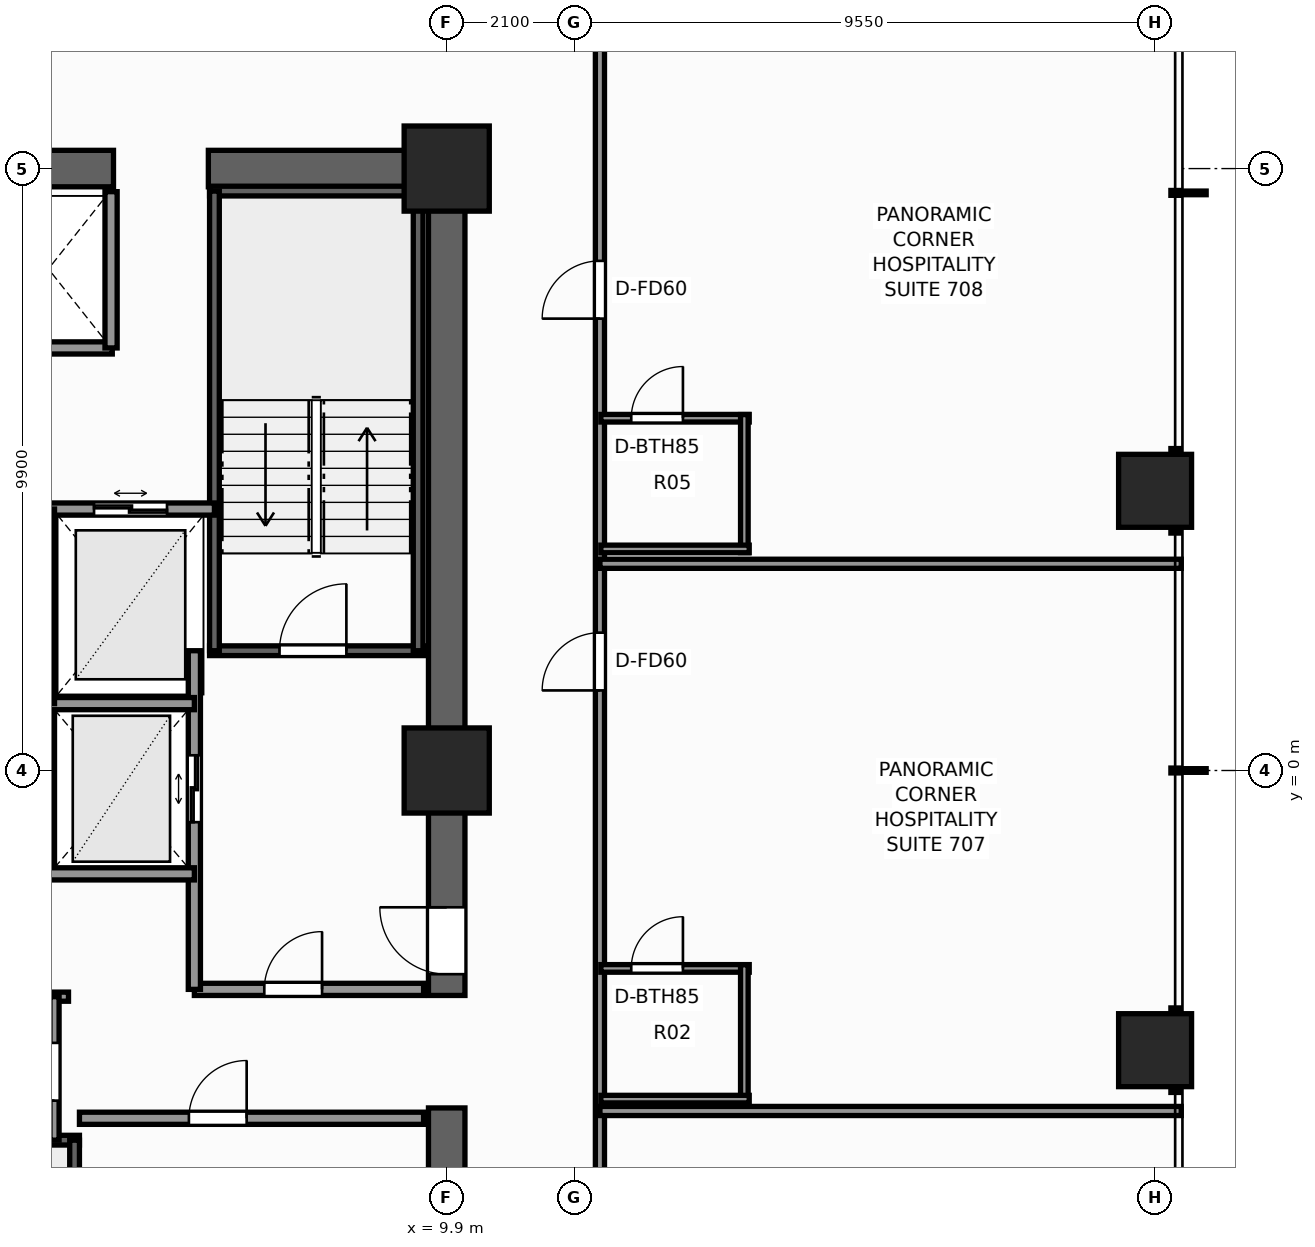
"""IFC4 building model, lengths in metres.
Left out: names, types, materials, properties, quantities, classifications, styles, units other than length and angle.
Written with IfcOpenShell. Run it as: python <this file> out.ifc"""

import sys

from ifc_helpers import new_model, si_unit, direction, frame, frame_2d, origin, origin_2d, place, context, subcontext, project, spatial, rectangle, extrude, element, fill, save


model = new_model("IFC4")
c1 = context("Model", 3, precision=1e-05, world=origin(), true_north=direction((0.0, 1.0)))
c2 = subcontext(c1, "Body", "Model", "MODEL_VIEW")
j1 = project(units=[si_unit("LENGTHUNIT", "METRE"), si_unit("PLANEANGLEUNIT", "RADIAN")], contexts=[c1])
p1 = place(None, origin())
s1 = spatial("IfcSite", under=j1, at=p1, CompositionType="ELEMENT")
p2 = place(p1, origin())
s2 = spatial("IfcBuilding", under=s1, at=p2, CompositionType="ELEMENT")
p3 = place(p2, frame((0.0, 0.0, 27.1)))
s3 = spatial("IfcBuildingStorey", under=s2, at=p3, CompositionType="ELEMENT", Elevation=27.1)
p4 = place(p3, frame((-10.2, 9.9, 0.0), z_axis=(0.0, 0.0, 1.0), x_axis=(1.0, 0.0, 0.0)))
e1 = element("IfcWall", 1, at=p4, inside=s3, PredefinedType="SHEAR", context=c2, shape_type="SweptSolid", body=[
    extrude(rectangle(XDim=14.62, YDim=0.6, at=frame_2d((7.31, 0.0))), origin(), (0.0, 0.0, 1.0), 3.3),
])
p5 = place(p3, frame((5.98, 9.9, 0.0), z_axis=(0.0, 0.0, 1.0), x_axis=(1.0, 0.0, 0.0)))
e2 = element("IfcWall", 2, at=p5, inside=s3, PredefinedType="SHEAR", context=c2, shape_type="SweptSolid", body=[
    extrude(rectangle(XDim=4.22, YDim=0.6, at=frame_2d((2.11, 0.0))), origin(), (0.0, 0.0, 1.0), 3.3),
])
p6 = place(p3, frame((9.9, -9.6, 0.0), z_axis=(0.0, 0.0, 1.0), x_axis=(0.0, 1.0, 0.0)))
e3 = element("IfcWall", 3, at=p6, inside=s3, PredefinedType="SHEAR", context=c2, shape_type="SweptSolid", body=[
    extrude(rectangle(XDim=4.05, YDim=0.6, at=frame_2d((2.025, 0.0))), origin(), (0.0, 0.0, 1.0), 3.3),
])
p7 = place(p3, frame((9.9, -3.7, 0.0), z_axis=(0.0, 0.0, 1.0), x_axis=(0.0, 1.0, 0.0)))
e4 = element("IfcWall", 4, at=p7, inside=s3, PredefinedType="SHEAR", context=c2, shape_type="SweptSolid", body=[
    extrude(rectangle(XDim=13.3, YDim=0.6, at=frame_2d((6.65, 0.0))), origin(), (0.0, 0.0, 1.0), 3.3),
])
p8 = place(p7, frame((0.35, 0.0, 0.0)))
e5 = element("IfcOpeningElement", 5, at=p8, cuts=e4, PredefinedType="OPENING", context=c2, shape_type="SweptSolid", body=[
    extrude(rectangle(XDim=1.1, YDim=2.2, at=frame_2d((0.55, 1.1))), frame((0.0, 0.31, 0.0), z_axis=(0.0, -1.0, 0.0), x_axis=(1.0, 0.0, 0.0)), (0.0, 0.0, 1.0), 0.62),
])
for number, where, z_axis, x_axis in (
    (6, (9.9, 9.9, 0.0), (0.0, 0.0, 1.0), (1.0, 0.0, 0.0)),
    (7, (9.9, 0.0, 0.0), (0.0, 0.0, 1.0), (1.0, 0.0, 0.0)),
):
    element("IfcColumn", number, at=place(p3, frame(where, z_axis=z_axis, x_axis=x_axis)), inside=s3, PredefinedType="COLUMN", context=c2, shape_type="SweptSolid", body=[
        extrude(rectangle(XDim=1.4, YDim=1.4, at=origin_2d()), origin(), (0.0, 0.0, 1.0), 3.3),
    ])
for number, where, z_axis, x_axis in (
    (8, (21.55, -4.6, 0.0), (0.0, 0.0, 1.0), (1.0, 0.0, 0.0)),
    (9, (21.55, 4.6, 0.0), (0.0, 0.0, 1.0), (1.0, 0.0, 0.0)),
):
    element("IfcColumn", number, at=place(p3, frame(where, z_axis=z_axis, x_axis=x_axis)), inside=s3, PredefinedType="COLUMN", context=c2, shape_type="SweptSolid", body=[
        extrude(rectangle(XDim=1.2, YDim=1.2, at=origin_2d()), origin(), (0.0, 0.0, 1.0), 3.3),
    ])
p9 = place(p3, frame((6.0, 1.97, 0.0), z_axis=(0.0, 0.0, 1.0), x_axis=(1.0, 0.0, 0.0)))
e10 = element("IfcWall", 10, at=p9, inside=s3, PredefinedType="SHEAR", context=c2, shape_type="SweptSolid", body=[
    extrude(rectangle(XDim=3.52, YDim=0.16, at=frame_2d((1.76, 0.0))), origin(), (0.0, 0.0, 1.0), 3.3),
])
p10 = place(p9, frame((1.15, 0.0, 0.0)))
e11 = element("IfcOpeningElement", 11, at=p10, cuts=e10, PredefinedType="OPENING", context=c2, shape_type="SweptSolid", body=[
    extrude(rectangle(XDim=1.1, YDim=2.2, at=frame_2d((0.55, 1.1))), frame((0.0, 0.09, 0.0), z_axis=(0.0, -1.0, 0.0), x_axis=(1.0, 0.0, 0.0)), (0.0, 0.0, 1.0), 0.18),
])
p11 = place(p3, frame((6.0, 9.53, 0.0), z_axis=(0.0, 0.0, 1.0), x_axis=(1.0, 0.0, 0.0)))
e12 = element("IfcWall", 12, at=p11, inside=s3, PredefinedType="SHEAR", context=c2, shape_type="SweptSolid", body=[
    extrude(rectangle(XDim=3.52, YDim=0.16, at=frame_2d((1.76, 0.0))), origin(), (0.0, 0.0, 1.0), 3.3),
])
for number, where, z_axis, x_axis in (
    (13, (6.08, 1.97, 0.0), (0.0, 0.0, 1.0), (0.0, 1.0, 0.0)),
    (14, (9.43, 1.97, 0.0), (0.0, 0.0, 1.0), (0.0, 1.0, 0.0)),
):
    element("IfcWall", number, at=place(p3, frame(where, z_axis=z_axis, x_axis=x_axis)), inside=s3, PredefinedType="SHEAR", context=c2, shape_type="SweptSolid", body=[
        extrude(rectangle(XDim=7.56, YDim=0.16, at=frame_2d((3.78, 0.0))), origin(), (0.0, 0.0, 1.0), 3.3),
    ])
p12 = place(p3, frame((-3.86, -6.08, 0.0), z_axis=(0.0, 0.0, 1.0), x_axis=(1.0, 0.0, 0.0)))
e15 = element("IfcWall", 15, at=p12, inside=s3, PredefinedType="SHEAR", context=c2, shape_type="SweptSolid", body=[
    extrude(rectangle(XDim=7.72, YDim=0.16, at=frame_2d((3.86, 0.0))), origin(), (0.0, 0.0, 1.0), 3.3),
])
p13 = place(p3, frame((3.78, -9.43, 0.0), z_axis=(0.0, 0.0, 1.0), x_axis=(0.0, 1.0, 0.0)))
e16 = element("IfcWall", 16, at=p13, inside=s3, PredefinedType="SHEAR", context=c2, shape_type="SweptSolid", body=[
    extrude(rectangle(XDim=3.35, YDim=0.16, at=frame_2d((1.675, 0.0))), origin(), (0.0, 0.0, 1.0), 3.3),
])
p14 = place(p3, frame((5.75, -3.6, 0.0), z_axis=(0.0, 0.0, 1.0), x_axis=(1.0, 0.0, 0.0)))
e17 = element("IfcWall", 17, at=p14, inside=s3, PredefinedType="SOLIDWALL", context=c2, shape_type="SweptSolid", body=[
    extrude(rectangle(XDim=3.77, YDim=0.2, at=frame_2d((1.885, 0.0))), origin(), (0.0, 0.0, 1.0), 3.06),
])
p15 = place(p14, frame((1.15, 0.0, 0.0)))
e18 = element("IfcOpeningElement", 18, at=p15, cuts=e17, PredefinedType="OPENING", context=c2, shape_type="SweptSolid", body=[
    extrude(rectangle(XDim=0.95, YDim=2.06, at=frame_2d((0.475, 1.03))), frame((0.0, 0.11, 0.0), z_axis=(0.0, -1.0, 0.0), x_axis=(1.0, 0.0, 0.0)), (0.0, 0.0, 1.0), 0.22),
])
p16 = place(p3, frame((5.75, -3.6, 0.0), z_axis=(0.0, 0.0, 1.0), x_axis=(0.0, 1.0, 0.0)))
e19 = element("IfcWall", 19, at=p16, inside=s3, PredefinedType="SOLIDWALL", context=c2, shape_type="SweptSolid", body=[
    extrude(rectangle(XDim=5.57, YDim=0.2, at=frame_2d((2.785, 0.0))), origin(), (0.0, 0.0, 1.0), 3.06),
])
p17 = place(p16, frame((2.75, 0.0, 0.0)))
e20 = element("IfcOpeningElement", 20, at=p17, cuts=e19, PredefinedType="OPENING", context=c2, shape_type="SweptSolid", body=[
    extrude(rectangle(XDim=1.1, YDim=2.2, at=frame_2d((0.55, 1.1))), frame((0.0, 0.11, 0.0), z_axis=(0.0, -1.0, 0.0), x_axis=(1.0, 0.0, 0.0)), (0.0, 0.0, 1.0), 0.22),
])
p18 = place(p3, frame((3.35, -1.7, 0.0), z_axis=(0.0, 0.0, 1.0), x_axis=(0.0, 1.0, 0.0)))
e21 = element("IfcWall", 21, at=p18, inside=s3, PredefinedType="SOLIDWALL", context=c2, shape_type="SweptSolid", body=[
    extrude(rectangle(XDim=2.8, YDim=0.2, at=frame_2d((1.4, 0.0))), origin(), (0.0, 0.0, 1.0), 3.06),
])
for number, where, z_axis, x_axis in (
    (22, (3.35, -1.7, 0.0), (0.0, 0.0, 1.0), (1.0, 0.0, 0.0)),
    (23, (3.35, 1.1, 0.0), (0.0, 0.0, 1.0), (1.0, 0.0, 0.0)),
):
    element("IfcWall", number, at=place(p3, frame(where, z_axis=z_axis, x_axis=x_axis)), inside=s3, PredefinedType="SOLIDWALL", context=c2, shape_type="SweptSolid", body=[
        extrude(rectangle(XDim=2.4, YDim=0.2, at=frame_2d((1.2, 0.0))), origin(), (0.0, 0.0, 1.0), 3.06),
    ])
p19 = place(p3, frame((3.35, 4.3, 0.0), z_axis=(0.0, 0.0, 1.0), x_axis=(1.0, 0.0, 0.0)))
e24 = element("IfcWall", 24, at=p19, inside=s3, PredefinedType="SOLIDWALL", context=c2, shape_type="SweptSolid", body=[
    extrude(rectangle(XDim=2.73, YDim=0.2, at=frame_2d((1.365, 0.0))), origin(), (0.0, 0.0, 1.0), 3.06),
])
p20 = place(p19, frame((0.75, 0.0, 0.0)))
e25 = element("IfcOpeningElement", 25, at=p20, cuts=e24, PredefinedType="OPENING", context=c2, shape_type="SweptSolid", body=[
    extrude(rectangle(XDim=1.2, YDim=2.25, at=frame_2d((0.6, 1.125))), frame((0.0, 0.11, 0.0), z_axis=(0.0, -1.0, 0.0), x_axis=(1.0, 0.0, 0.0)), (0.0, 0.0, 1.0), 0.22),
])
p21 = place(p3, frame((0.22, 6.95, 0.0), z_axis=(0.0, 0.0, 1.0), x_axis=(1.0, 0.0, 0.0)))
e26 = element("IfcWall", 26, at=p21, inside=s3, PredefinedType="SOLIDWALL", context=c2, shape_type="SweptSolid", body=[
    extrude(rectangle(XDim=4.18, YDim=0.2, at=frame_2d((2.09, 0.0))), origin(), (0.0, 0.0, 1.0), 3.06),
])
p22 = place(p3, frame((4.38, 6.95, 0.0), z_axis=(0.0, 0.0, 1.0), x_axis=(0.0, 1.0, 0.0)))
e27 = element("IfcWall", 27, at=p22, inside=s3, PredefinedType="SOLIDWALL", context=c2, shape_type="SweptSolid", body=[
    extrude(rectangle(XDim=2.57, YDim=0.2, at=frame_2d((1.285, 0.0))), origin(), (0.0, 0.0, 1.0), 3.06),
])
p23 = place(p3, frame((3.86, -5.72, 0.0), z_axis=(0.0, 0.0, 1.0), x_axis=(1.0, 0.0, 0.0)))
e28 = element("IfcWall", 28, at=p23, inside=s3, PredefinedType="SOLIDWALL", context=c2, shape_type="SweptSolid", body=[
    extrude(rectangle(XDim=5.66, YDim=0.2, at=frame_2d((2.83, 0.0))), origin(), (0.0, 0.0, 1.0), 3.06),
])
p24 = place(p23, frame((1.8, 0.0, 0.0)))
e29 = element("IfcOpeningElement", 29, at=p24, cuts=e28, PredefinedType="OPENING", context=c2, shape_type="SweptSolid", body=[
    extrude(rectangle(XDim=0.95, YDim=2.06, at=frame_2d((0.475, 1.03))), frame((0.0, 0.11, 0.0), z_axis=(0.0, -1.0, 0.0), x_axis=(1.0, 0.0, 0.0)), (0.0, 0.0, 1.0), 0.22),
])
p25 = place(p3, frame((3.35, 1.1, 0.0), z_axis=(0.0, 0.0, 1.0), x_axis=(0.0, 1.0, 0.0)))
e30 = element("IfcWall", 30, at=p25, inside=s3, PredefinedType="SOLIDWALL", context=c2, shape_type="SweptSolid", body=[
    extrude(rectangle(XDim=3.2, YDim=0.2, at=frame_2d((1.6, 0.0))), origin(), (0.0, 0.0, 1.0), 3.06),
])
p26 = place(p3, frame((-3.68, -3.72, 0.0), z_axis=(0.0, 0.0, 1.0), x_axis=(1.0, 0.0, 0.0)))
e31 = element("IfcWall", 31, at=p26, inside=s3, PredefinedType="PARTITIONING", context=c2, shape_type="SweptSolid", body=[
    extrude(rectangle(XDim=7.36, YDim=0.15, at=frame_2d((3.68, 0.0))), origin(), (0.0, 0.0, 1.0), 3.06),
])
p27 = place(p3, frame((3.45, -6.08, 0.0), z_axis=(0.0, 0.0, 1.0), x_axis=(0.0, 1.0, 0.0)))
e32 = element("IfcWall", 32, at=p27, inside=s3, PredefinedType="PARTITIONING", context=c2, shape_type="SweptSolid", body=[
    extrude(rectangle(XDim=2.36, YDim=0.15, at=frame_2d((1.18, 0.0))), origin(), (0.0, 0.0, 1.0), 3.06),
])
p28 = place(p27, frame((0.65, 0.0, 0.0)))
e33 = element("IfcOpeningElement", 33, at=p28, cuts=e32, PredefinedType="OPENING", context=c2, shape_type="SweptSolid", body=[
    extrude(rectangle(XDim=0.95, YDim=2.06, at=frame_2d((0.475, 1.03))), frame((0.0, 0.085, 0.0), z_axis=(0.0, -1.0, 0.0), x_axis=(1.0, 0.0, 0.0)), (0.0, 0.0, 1.0), 0.17),
])
p29 = place(p3, frame((12.42, -12.26, 0.0), z_axis=(0.0, 0.0, 1.0), x_axis=(0.0, 1.0, 0.0)))
e34 = element("IfcWall", 34, at=p29, inside=s3, PredefinedType="PARTITIONING", context=c2, shape_type="SweptSolid", body=[
    extrude(rectangle(XDim=24.84, YDim=0.15, at=frame_2d((12.42, 0.0))), origin(), (0.0, 0.0, 1.0), 2.272),
])
p30 = place(p29, frame((4.099, 0.0, 0.0)))
e35 = element("IfcOpeningElement", 35, at=p30, cuts=e34, PredefinedType="OPENING", context=c2, shape_type="SweptSolid", body=[
    extrude(rectangle(XDim=0.95, YDim=2.06, at=frame_2d((0.475, 1.03))), frame((0.0, 0.085, 0.0), z_axis=(0.0, -1.0, 0.0), x_axis=(1.0, 0.0, 0.0)), (0.0, 0.0, 1.0), 0.17),
])
p31 = place(p29, frame((13.577, 0.0, 0.0)))
e36 = element("IfcOpeningElement", 36, at=p31, cuts=e34, PredefinedType="OPENING", context=c2, shape_type="SweptSolid", body=[
    extrude(rectangle(XDim=0.95, YDim=2.06, at=frame_2d((0.475, 1.03))), frame((0.0, 0.085, 0.0), z_axis=(0.0, -1.0, 0.0), x_axis=(1.0, 0.0, 0.0)), (0.0, 0.0, 1.0), 0.17),
])
p32 = place(p29, frame((19.692, 0.0, 0.0)))
e37 = element("IfcOpeningElement", 37, at=p32, cuts=e34, PredefinedType="OPENING", context=c2, shape_type="SweptSolid", body=[
    extrude(rectangle(XDim=0.95, YDim=2.06, at=frame_2d((0.475, 1.03))), frame((0.0, 0.085, 0.0), z_axis=(0.0, -1.0, 0.0), x_axis=(1.0, 0.0, 0.0)), (0.0, 0.0, 1.0), 0.17),
])
for number, where, z_axis, x_axis in (
    (38, (12.42, -5.6, 0.0), (0.0, 0.0, 1.0), (1.0, 0.0, 0.0)),
    (39, (12.42, 3.4, 0.0), (0.0, 0.0, 1.0), (1.0, 0.0, 0.0)),
):
    element("IfcWall", number, at=place(p3, frame(where, z_axis=z_axis, x_axis=x_axis)), inside=s3, PredefinedType="PARTITIONING", context=c2, shape_type="SweptSolid", body=[
        extrude(rectangle(XDim=9.56, YDim=0.15, at=frame_2d((4.78, 0.0))), origin(), (0.0, 0.0, 1.0), 2.429),
    ])
p33 = place(p3, frame((12.435, -3.255, 0.0), z_axis=(0.0, 0.0, 1.0), x_axis=(1.0, 0.0, 0.0)))
e40 = element("IfcWall", 40, at=p33, inside=s3, PredefinedType="PARTITIONING", context=c2, shape_type="SweptSolid", body=[
    extrude(rectangle(XDim=2.44, YDim=0.125, at=frame_2d((1.22, 0.0))), origin(), (0.0, 0.0, 1.0), 3.06),
])
p34 = place(p33, frame((0.5, 0.0, 0.0)))
e41 = element("IfcOpeningElement", 41, at=p34, cuts=e40, PredefinedType="OPENING", context=c2, shape_type="SweptSolid", body=[
    extrude(rectangle(XDim=0.85, YDim=2.03, at=frame_2d((0.425, 1.015))), frame((0.0, 0.073, 0.0), z_axis=(0.0, -1.0, 0.0), x_axis=(1.0, 0.0, 0.0)), (0.0, 0.0, 1.0), 0.145),
])
p35 = place(p3, frame((14.795, -5.465, 0.0), z_axis=(0.0, 0.0, 1.0), x_axis=(0.0, 1.0, 0.0)))
e42 = element("IfcWall", 42, at=p35, inside=s3, PredefinedType="PARTITIONING", context=c2, shape_type="SweptSolid", body=[
    extrude(rectangle(XDim=2.27, YDim=0.125, at=frame_2d((1.135, 0.0))), origin(), (0.0, 0.0, 1.0), 2.272),
])
p36 = place(p3, frame((12.435, -5.405, 0.0), z_axis=(0.0, 0.0, 1.0), x_axis=(1.0, 0.0, 0.0)))
e43 = element("IfcWall", 43, at=p36, inside=s3, PredefinedType="PARTITIONING", context=c2, shape_type="SweptSolid", body=[
    extrude(rectangle(XDim=2.44, YDim=0.125, at=frame_2d((1.22, 0.0))), origin(), (0.0, 0.0, 1.0), 3.06),
])
p37 = place(p3, frame((12.435, 5.794, 0.0), z_axis=(0.0, 0.0, 1.0), x_axis=(1.0, 0.0, 0.0)))
e44 = element("IfcWall", 44, at=p37, inside=s3, PredefinedType="PARTITIONING", context=c2, shape_type="SweptSolid", body=[
    extrude(rectangle(XDim=2.44, YDim=0.125, at=frame_2d((1.22, 0.0))), origin(), (0.0, 0.0, 1.0), 3.06),
])
p38 = place(p37, frame((0.5, 0.0, 0.0)))
e45 = element("IfcOpeningElement", 45, at=p38, cuts=e44, PredefinedType="OPENING", context=c2, shape_type="SweptSolid", body=[
    extrude(rectangle(XDim=0.85, YDim=2.03, at=frame_2d((0.425, 1.015))), frame((0.0, 0.073, 0.0), z_axis=(0.0, -1.0, 0.0), x_axis=(1.0, 0.0, 0.0)), (0.0, 0.0, 1.0), 0.145),
])
p39 = place(p3, frame((14.795, 3.584, 0.0), z_axis=(0.0, 0.0, 1.0), x_axis=(0.0, 1.0, 0.0)))
e46 = element("IfcWall", 46, at=p39, inside=s3, PredefinedType="PARTITIONING", context=c2, shape_type="SweptSolid", body=[
    extrude(rectangle(XDim=2.27, YDim=0.125, at=frame_2d((1.135, 0.0))), origin(), (0.0, 0.0, 1.0), 2.272),
])
p40 = place(p3, frame((12.435, 3.644, 0.0), z_axis=(0.0, 0.0, 1.0), x_axis=(1.0, 0.0, 0.0)))
e47 = element("IfcWall", 47, at=p40, inside=s3, PredefinedType="PARTITIONING", context=c2, shape_type="SweptSolid", body=[
    extrude(rectangle(XDim=2.44, YDim=0.125, at=frame_2d((1.22, 0.0))), origin(), (0.0, 0.0, 1.0), 3.06),
])
p41 = place(p10, origin())
e48 = element("IfcDoor", 48, at=p41, inside=s3, OperationType="SINGLE_SWING_RIGHT", PredefinedType="DOOR", context=c2, shape_type="SweptSolid", body=[
    extrude(rectangle(XDim=1.1, YDim=2.2, at=frame_2d((0.55, 1.1))), frame((0.0, 0.025, 0.0), z_axis=(0.0, -1.0, 0.0), x_axis=(1.0, 0.0, 0.0)), (0.0, 0.0, 1.0), 0.05),
])
fill(e11, e48)
p42 = place(p8, origin())
e49 = element("IfcDoor", 49, at=p42, inside=s3, OperationType="SINGLE_SWING_RIGHT", PredefinedType="DOOR", context=c2, shape_type="SweptSolid", body=[
    extrude(rectangle(XDim=1.1, YDim=2.2, at=frame_2d((0.55, 1.1))), frame((0.0, 0.025, 0.0), z_axis=(0.0, -1.0, 0.0), x_axis=(1.0, 0.0, 0.0)), (0.0, 0.0, 1.0), 0.05),
])
fill(e5, e49)
p43 = place(p17, origin())
e50 = element("IfcDoor", 50, at=p43, inside=s3, OperationType="DOUBLE_DOOR_SLIDING", PredefinedType="DOOR", context=c2, shape_type="SweptSolid", body=[
    extrude(rectangle(XDim=1.1, YDim=2.2, at=frame_2d((0.55, 1.1))), frame((0.0, 0.025, 0.0), z_axis=(0.0, -1.0, 0.0), x_axis=(1.0, 0.0, 0.0)), (0.0, 0.0, 1.0), 0.05),
])
fill(e20, e50)
p44 = place(p20, origin())
e51 = element("IfcDoor", 51, at=p44, inside=s3, OperationType="DOUBLE_DOOR_SLIDING", PredefinedType="DOOR", context=c2, shape_type="SweptSolid", body=[
    extrude(rectangle(XDim=1.2, YDim=2.25, at=frame_2d((0.6, 1.125))), frame((0.0, 0.025, 0.0), z_axis=(0.0, -1.0, 0.0), x_axis=(1.0, 0.0, 0.0)), (0.0, 0.0, 1.0), 0.05),
])
fill(e25, e51)
p45 = place(p24, origin())
e52 = element("IfcDoor", 52, at=p45, inside=s3, OperationType="SINGLE_SWING_RIGHT", PredefinedType="DOOR", context=c2, shape_type="SweptSolid", body=[
    extrude(rectangle(XDim=0.95, YDim=2.06, at=frame_2d((0.475, 1.03))), frame((0.0, 0.025, 0.0), z_axis=(0.0, -1.0, 0.0), x_axis=(1.0, 0.0, 0.0)), (0.0, 0.0, 1.0), 0.05),
])
fill(e29, e52)
p46 = place(p15, origin())
e53 = element("IfcDoor", 53, at=p46, inside=s3, OperationType="SINGLE_SWING_RIGHT", PredefinedType="DOOR", context=c2, shape_type="SweptSolid", body=[
    extrude(rectangle(XDim=0.95, YDim=2.06, at=frame_2d((0.475, 1.03))), frame((0.0, 0.025, 0.0), z_axis=(0.0, -1.0, 0.0), x_axis=(1.0, 0.0, 0.0)), (0.0, 0.0, 1.0), 0.05),
])
fill(e18, e53)
p47 = place(p28, origin())
e54 = element("IfcDoor", 54, at=p47, inside=s3, OperationType="SINGLE_SWING_LEFT", PredefinedType="DOOR", context=c2, shape_type="SweptSolid", body=[
    extrude(rectangle(XDim=0.95, YDim=2.06, at=frame_2d((0.475, 1.03))), frame((0.0, 0.025, 0.0), z_axis=(0.0, -1.0, 0.0), x_axis=(1.0, 0.0, 0.0)), (0.0, 0.0, 1.0), 0.05),
])
fill(e33, e54)
p48 = place(p34, origin())
e55 = element("IfcDoor", 55, at=p48, inside=s3, OperationType="SINGLE_SWING_RIGHT", PredefinedType="DOOR", context=c2, shape_type="SweptSolid", body=[
    extrude(rectangle(XDim=0.85, YDim=2.03, at=frame_2d((0.425, 1.015))), frame((0.0, 0.025, 0.0), z_axis=(0.0, -1.0, 0.0), x_axis=(1.0, 0.0, 0.0)), (0.0, 0.0, 1.0), 0.05),
])
fill(e41, e55)
p49 = place(p31, origin())
e56 = element("IfcDoor", 56, at=p49, inside=s3, OperationType="SINGLE_SWING_LEFT", PredefinedType="DOOR", context=c2, shape_type="SweptSolid", body=[
    extrude(rectangle(XDim=0.95, YDim=2.06, at=frame_2d((0.475, 1.03))), frame((0.0, 0.025, 0.0), z_axis=(0.0, -1.0, 0.0), x_axis=(1.0, 0.0, 0.0)), (0.0, 0.0, 1.0), 0.05),
])
fill(e36, e56)
p50 = place(p38, origin())
e57 = element("IfcDoor", 57, at=p50, inside=s3, OperationType="SINGLE_SWING_RIGHT", PredefinedType="DOOR", context=c2, shape_type="SweptSolid", body=[
    extrude(rectangle(XDim=0.85, YDim=2.03, at=frame_2d((0.425, 1.015))), frame((0.0, 0.025, 0.0), z_axis=(0.0, -1.0, 0.0), x_axis=(1.0, 0.0, 0.0)), (0.0, 0.0, 1.0), 0.05),
])
fill(e45, e57)
p51 = place(p32, origin())
e58 = element("IfcDoor", 58, at=p51, inside=s3, OperationType="SINGLE_SWING_LEFT", PredefinedType="DOOR", context=c2, shape_type="SweptSolid", body=[
    extrude(rectangle(XDim=0.95, YDim=2.06, at=frame_2d((0.475, 1.03))), frame((0.0, 0.025, 0.0), z_axis=(0.0, -1.0, 0.0), x_axis=(1.0, 0.0, 0.0)), (0.0, 0.0, 1.0), 0.05),
])
fill(e37, e58)
save(model, sys.argv[1])
